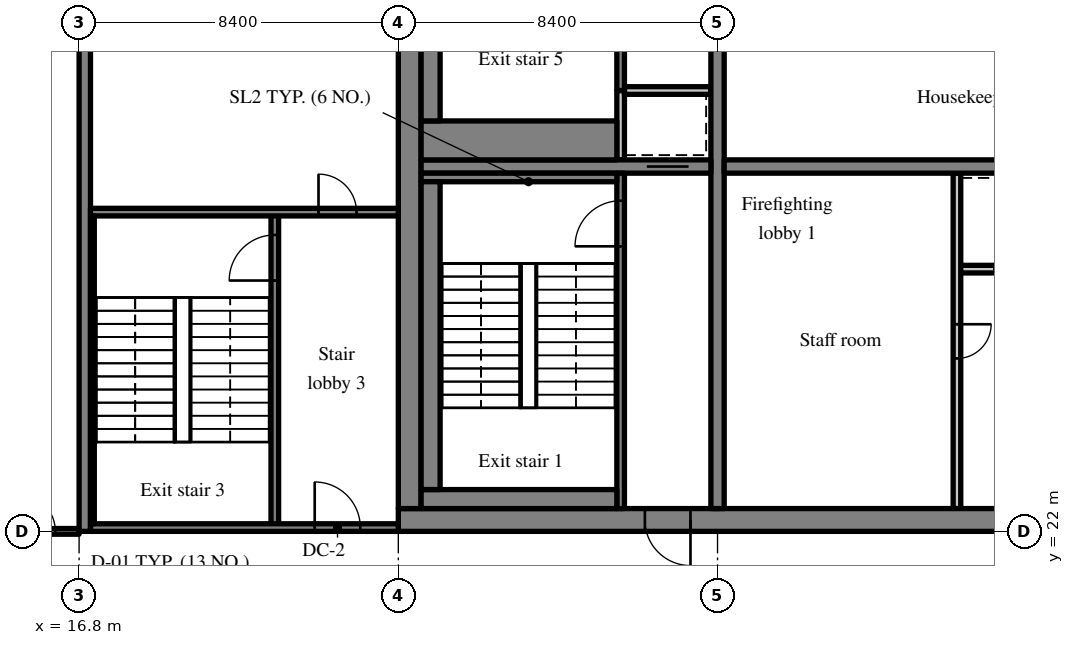
"""IFC4 building model, lengths in metres.
Left out: names, types, materials, properties, quantities, classifications, styles, units other than length and angle.
Written with IfcOpenShell. Run it as: python <this file> out.ifc"""

import sys

from ifc_helpers import new_model, si_unit, direction, frame, frame_2d, origin, place, context, subcontext, project, spatial, rectangle, extrude, source, transform, mapped, element, fill, save


model = new_model("IFC4")
c1 = context("Model", 3, precision=1e-05, world=origin(), true_north=direction((0.0, 1.0)))
c2 = subcontext(c1, "Body", "Model", "MODEL_VIEW")
j1 = project(units=[si_unit("LENGTHUNIT", "METRE"), si_unit("PLANEANGLEUNIT", "RADIAN")], contexts=[c1])
p1 = place(None, origin())
s1 = spatial("IfcSite", under=j1, at=p1, CompositionType="ELEMENT")
p2 = place(p1, origin())
s2 = spatial("IfcBuilding", under=s1, at=p2, CompositionType="ELEMENT")
p3 = place(p2, frame((0.0, 0.0, 249.1)))
s3 = spatial("IfcBuildingStorey", under=s2, at=p3, CompositionType="ELEMENT", Elevation=249.1)
m1 = source(origin(), c2, "Body", "SweptSolid", [
    extrude(rectangle(XDim=50.4, YDim=0.6, at=frame_2d((25.2, 0.0))), origin(), (0.0, 0.0, 1.0), 3.62),
])
p4 = place(p3, frame((25.2, 22.3, 0.0), z_axis=(0.0, 0.0, 1.0), x_axis=(1.0, 0.0, 0.0)))
e1 = element("IfcWall", 1, at=p4, inside=s3, PredefinedType="SHEAR", context=c2, shape_type="MappedRepresentation", body=[
    mapped(m1, transform((0.0, 0.0, 0.0), scale=1.0)),
])
m2 = source(origin(), c2, "Body", "SweptSolid", [
    extrude(rectangle(XDim=1.8, YDim=2.1, at=frame_2d((0.9, 1.05))), frame((0.0, 0.31, 0.0), z_axis=(0.0, -1.0, 0.0), x_axis=(1.0, 0.0, 0.0)), (0.0, 0.0, 1.0), 0.62),
])
p5 = place(p4, frame((15.9, 0.0, 0.0)))
e2 = element("IfcOpeningElement", 2, at=p5, cuts=e1, PredefinedType="OPENING", context=c2, shape_type="MappedRepresentation", body=[
    mapped(m2, transform((0.0, 0.0, 0.0), scale=1.0)),
])
m3 = source(origin(), c2, "Body", "SweptSolid", [
    extrude(rectangle(XDim=0.9, YDim=2.1, at=frame_2d((0.45, 1.05))), frame((0.0, 0.31, 0.0), z_axis=(0.0, -1.0, 0.0), x_axis=(1.0, 0.0, 0.0)), (0.0, 0.0, 1.0), 0.62),
])
p6 = place(p4, frame((21.513, 0.0, 0.0)))
e3 = element("IfcOpeningElement", 3, at=p6, cuts=e1, PredefinedType="OPENING", context=c2, shape_type="MappedRepresentation", body=[
    mapped(m3, transform((0.0, 0.0, 0.0), scale=1.0)),
])
p7 = place(p4, frame((32.7, 0.0, 0.0)))
e4 = element("IfcOpeningElement", 4, at=p7, cuts=e1, PredefinedType="OPENING", context=c2, shape_type="MappedRepresentation", body=[
    mapped(m2, transform((0.0, 0.0, 0.0), scale=1.0)),
])
m4 = source(origin(), c2, "Body", "SweptSolid", [
    extrude(rectangle(XDim=1.2, YDim=2.1, at=frame_2d((0.6, 1.05))), frame((0.0, 0.31, 0.0), z_axis=(0.0, -1.0, 0.0), x_axis=(1.0, 0.0, 0.0)), (0.0, 0.0, 1.0), 0.62),
])
p8 = place(p4, frame((6.488, 0.0, 0.0)))
e5 = element("IfcOpeningElement", 5, at=p8, cuts=e1, PredefinedType="OPENING", context=c2, shape_type="MappedRepresentation", body=[
    mapped(m4, transform((0.0, 0.0, 0.0), scale=1.0)),
])
p9 = place(p4, frame((47.925, 0.0, 0.0)))
e6 = element("IfcOpeningElement", 6, at=p9, cuts=e1, PredefinedType="OPENING", context=c2, shape_type="MappedRepresentation", body=[
    mapped(m4, transform((0.0, 0.0, 0.0), scale=1.0)),
])
m5 = source(origin(), c2, "Body", "SweptSolid", [
    extrude(rectangle(XDim=18.8, YDim=0.6, at=frame_2d((9.4, 0.0))), origin(), (0.0, 0.0, 1.0), 3.62),
])
p10 = place(p3, frame((25.5, 22.6, 0.0), z_axis=(0.0, 0.0, 1.0), x_axis=(0.0, 1.0, 0.0)))
e7 = element("IfcWall", 7, at=p10, inside=s3, PredefinedType="SHEAR", context=c2, shape_type="MappedRepresentation", body=[
    mapped(m5, transform((0.0, 0.0, 0.0), scale=1.0)),
])
m6 = source(origin(), c2, "Body", "SweptSolid", [
    extrude(rectangle(XDim=18.8, YDim=0.35, at=frame_2d((9.4, 0.0))), origin(), (0.0, 0.0, 1.0), 3.62),
])
p11 = place(p3, frame((33.6, 22.6, 0.0), z_axis=(0.0, 0.0, 1.0), x_axis=(0.0, 1.0, 0.0)))
e8 = element("IfcWall", 8, at=p11, inside=s3, PredefinedType="SHEAR", context=c2, shape_type="MappedRepresentation", body=[
    mapped(m6, transform((0.0, 0.0, 0.0), scale=1.0)),
])
m7 = source(origin(), c2, "Body", "SweptSolid", [
    extrude(rectangle(XDim=1.1, YDim=2.1, at=frame_2d((0.55, 1.05))), frame((0.0, 0.185, 0.0), z_axis=(0.0, -1.0, 0.0), x_axis=(1.0, 0.0, 0.0)), (0.0, 0.0, 1.0), 0.37),
])
p12 = place(p11, frame((12.85, 0.0, 0.0)))
e9 = element("IfcOpeningElement", 9, at=p12, cuts=e8, PredefinedType="OPENING", context=c2, shape_type="MappedRepresentation", body=[
    mapped(m7, transform((0.0, 0.0, 0.0), scale=1.0)),
])
m8 = source(origin(), c2, "Body", "SweptSolid", [
    extrude(rectangle(XDim=7.625, YDim=0.35, at=frame_2d((3.812, 0.0))), origin(), (0.0, 0.0, 1.0), 3.62),
])
p13 = place(p3, frame((25.8, 31.6, 0.0), z_axis=(0.0, 0.0, 1.0), x_axis=(1.0, 0.0, 0.0)))
e10 = element("IfcWall", 10, at=p13, inside=s3, PredefinedType="SHEAR", context=c2, shape_type="MappedRepresentation", body=[
    mapped(m8, transform((0.0, 0.0, 0.0), scale=1.0)),
])
p14 = place(p13, frame((5.938, 0.0, 0.0)))
e11 = element("IfcOpeningElement", 11, at=p14, cuts=e10, PredefinedType="OPENING", context=c2, shape_type="MappedRepresentation", body=[
    mapped(m7, transform((0.0, 0.0, 0.0), scale=1.0)),
])
m9 = source(origin(), c2, "Body", "SweptSolid", [
    extrude(rectangle(XDim=16.45, YDim=0.35, at=frame_2d((8.225, 0.0))), origin(), (0.0, 0.0, 1.0), 3.62),
])
p15 = place(p3, frame((33.775, 31.6, 0.0), z_axis=(0.0, 0.0, 1.0), x_axis=(1.0, 0.0, 0.0)))
e12 = element("IfcWall", 12, at=p15, inside=s3, PredefinedType="SHEAR", context=c2, shape_type="MappedRepresentation", body=[
    mapped(m9, transform((0.0, 0.0, 0.0), scale=1.0)),
])
m10 = source(origin(), c2, "Body", "SweptSolid", [
    extrude(rectangle(XDim=1.0, YDim=2.1, at=frame_2d((0.5, 1.05))), frame((0.0, 0.185, 0.0), z_axis=(0.0, -1.0, 0.0), x_axis=(1.0, 0.0, 0.0)), (0.0, 0.0, 1.0), 0.37),
])
p16 = place(p15, frame((14.837, 0.0, 0.0)))
e13 = element("IfcOpeningElement", 13, at=p16, cuts=e12, PredefinedType="OPENING", context=c2, shape_type="MappedRepresentation", body=[
    mapped(m10, transform((0.0, 0.0, 0.0), scale=1.0)),
])
m11 = source(origin(), c2, "Body", "SweptSolid", [
    extrude(rectangle(XDim=18.4, YDim=0.3, at=frame_2d((9.2, 0.0))), origin(), (0.0, 0.0, 1.0), 3.62),
])
p17 = place(p3, frame((16.95, 22.0, 0.0), z_axis=(0.0, 0.0, 1.0), x_axis=(0.0, 1.0, 0.0)))
e14 = element("IfcWall", 14, at=p17, inside=s3, PredefinedType="SHEAR", context=c2, shape_type="MappedRepresentation", body=[
    mapped(m11, transform((0.0, 0.0, 0.0), scale=1.0)),
])
m12 = source(origin(), c2, "Body", "SweptSolid", [
    extrude(rectangle(XDim=6.0, YDim=0.2, at=frame_2d((3.0, 0.0))), origin(), (0.0, 0.0, 1.0), 3.62),
])
p18 = place(p3, frame((39.9, 28.9, 0.0), z_axis=(0.0, 0.0, 1.0), x_axis=(1.0, 0.0, 0.0)))
e15 = element("IfcWall", 15, at=p18, inside=s3, PredefinedType="SOLIDWALL", context=c2, shape_type="MappedRepresentation", body=[
    mapped(m12, transform((0.0, 0.0, 0.0), scale=1.0)),
])
m13 = source(origin(), c2, "Body", "SweptSolid", [
    extrude(rectangle(XDim=1.1, YDim=2.1, at=frame_2d((0.55, 1.05))), frame((0.0, 0.11, 0.0), z_axis=(0.0, -1.0, 0.0), x_axis=(1.0, 0.0, 0.0)), (0.0, 0.0, 1.0), 0.22),
])
p19 = place(p18, frame((0.95, 0.0, 0.0)))
e16 = element("IfcOpeningElement", 16, at=p19, cuts=e15, PredefinedType="OPENING", context=c2, shape_type="MappedRepresentation", body=[
    mapped(m13, transform((0.0, 0.0, 0.0), scale=1.0)),
])
p20 = place(p18, frame((3.95, 0.0, 0.0)))
e17 = element("IfcOpeningElement", 17, at=p20, cuts=e15, PredefinedType="OPENING", context=c2, shape_type="MappedRepresentation", body=[
    mapped(m13, transform((0.0, 0.0, 0.0), scale=1.0)),
])
m14 = source(origin(), c2, "Body", "SweptSolid", [
    extrude(rectangle(XDim=8.825, YDim=0.2, at=frame_2d((4.413, 0.0))), origin(), (0.0, 0.0, 1.0), 3.62),
])
p21 = place(p3, frame((39.9, 22.6, 0.0), z_axis=(0.0, 0.0, 1.0), x_axis=(0.0, 1.0, 0.0)))
e18 = element("IfcWall", 18, at=p21, inside=s3, PredefinedType="PARTITIONING", context=c2, shape_type="MappedRepresentation", body=[
    mapped(m14, transform((0.0, 0.0, 0.0), scale=1.0)),
])
m15 = source(origin(), c2, "Body", "SweptSolid", [
    extrude(rectangle(XDim=0.9, YDim=2.1, at=frame_2d((0.45, 1.05))), frame((0.0, 0.11, 0.0), z_axis=(0.0, -1.0, 0.0), x_axis=(1.0, 0.0, 0.0)), (0.0, 0.0, 1.0), 0.22),
])
p22 = place(p21, frame((3.95, 0.0, 0.0)))
e19 = element("IfcOpeningElement", 19, at=p22, cuts=e18, PredefinedType="OPENING", context=c2, shape_type="MappedRepresentation", body=[
    mapped(m15, transform((0.0, 0.0, 0.0), scale=1.0)),
])
m16 = source(origin(), c2, "Body", "SweptSolid", [
    extrude(rectangle(XDim=8.825, YDim=0.2, at=frame_2d((4.413, 0.0))), origin(), (0.0, 0.0, 1.0), 3.62),
])
p23 = place(p3, frame((31.05, 22.6, 0.0), z_axis=(0.0, 0.0, 1.0), x_axis=(0.0, 1.0, 0.0)))
e20 = element("IfcWall", 20, at=p23, inside=s3, PredefinedType="SOLIDWALL", context=c2, shape_type="MappedRepresentation", body=[
    mapped(m16, transform((0.0, 0.0, 0.0), scale=1.0)),
])
m17 = source(origin(), c2, "Body", "SweptSolid", [
    extrude(rectangle(XDim=1.2, YDim=2.1, at=frame_2d((0.6, 1.05))), frame((0.0, 0.11, 0.0), z_axis=(0.0, -1.0, 0.0), x_axis=(1.0, 0.0, 0.0)), (0.0, 0.0, 1.0), 0.22),
])
p24 = place(p23, frame((6.9, 0.0, 0.0)))
e21 = element("IfcOpeningElement", 21, at=p24, cuts=e20, PredefinedType="OPENING", context=c2, shape_type="MappedRepresentation", body=[
    mapped(m17, transform((0.0, 0.0, 0.0), scale=1.0)),
])
m18 = source(origin(), c2, "Body", "SweptSolid", [
    extrude(rectangle(XDim=1.825, YDim=0.2, at=frame_2d((0.913, 0.0))), origin(), (0.0, 0.0, 1.0), 3.62),
])
p25 = place(p3, frame((31.05, 31.775, 0.0), z_axis=(0.0, 0.0, 1.0), x_axis=(0.0, 1.0, 0.0)))
e22 = element("IfcWall", 22, at=p25, inside=s3, PredefinedType="SOLIDWALL", context=c2, shape_type="MappedRepresentation", body=[
    mapped(m18, transform((0.0, 0.0, 0.0), scale=1.0)),
])
m19 = source(origin(), c2, "Body", "SweptSolid", [
    extrude(rectangle(XDim=2.275, YDim=0.2, at=frame_2d((1.138, 0.0))), origin(), (0.0, 0.0, 1.0), 3.62),
])
p26 = place(p3, frame((31.15, 33.6, 0.0), z_axis=(0.0, 0.0, 1.0), x_axis=(1.0, 0.0, 0.0)))
e23 = element("IfcWall", 23, at=p26, inside=s3, PredefinedType="SOLIDWALL", context=c2, shape_type="MappedRepresentation", body=[
    mapped(m19, transform((0.0, 0.0, 0.0), scale=1.0)),
])
m20 = source(origin(), c2, "Body", "SweptSolid", [
    extrude(rectangle(XDim=7.8, YDim=0.2, at=frame_2d((3.9, 0.0))), origin(), (0.0, 0.0, 1.0), 3.62),
])
p27 = place(p3, frame((31.05, 33.6, 0.0), z_axis=(0.0, 0.0, 1.0), x_axis=(0.0, 1.0, 0.0)))
e24 = element("IfcWall", 24, at=p27, inside=s3, PredefinedType="SOLIDWALL", context=c2, shape_type="MappedRepresentation", body=[
    mapped(m20, transform((0.0, 0.0, 0.0), scale=1.0)),
])
m21 = source(origin(), c2, "Body", "SweptSolid", [
    extrude(rectangle(XDim=1.8, YDim=2.1, at=frame_2d((0.9, 1.05))), frame((0.0, 0.11, 0.0), z_axis=(0.0, -1.0, 0.0), x_axis=(1.0, 0.0, 0.0)), (0.0, 0.0, 1.0), 0.22),
])
p28 = place(p27, frame((5.3, 0.0, 0.0)))
e25 = element("IfcOpeningElement", 25, at=p28, cuts=e24, PredefinedType="OPENING", context=c2, shape_type="MappedRepresentation", body=[
    mapped(m21, transform((0.0, 0.0, 0.0), scale=1.0)),
])
m22 = source(origin(), c2, "Body", "SweptSolid", [
    extrude(rectangle(XDim=8.3, YDim=0.2, at=frame_2d((4.15, 0.0))), origin(), (0.0, 0.0, 1.0), 3.62),
])
p29 = place(p3, frame((21.95, 22.1, 0.0), z_axis=(0.0, 0.0, 1.0), x_axis=(0.0, 1.0, 0.0)))
e26 = element("IfcWall", 26, at=p29, inside=s3, PredefinedType="SOLIDWALL", context=c2, shape_type="MappedRepresentation", body=[
    mapped(m22, transform((0.0, 0.0, 0.0), scale=1.0)),
])
p30 = place(p29, frame((6.5, 0.0, 0.0)))
e27 = element("IfcOpeningElement", 27, at=p30, cuts=e26, PredefinedType="OPENING", context=c2, shape_type="MappedRepresentation", body=[
    mapped(m17, transform((0.0, 0.0, 0.0), scale=1.0)),
])
m23 = source(origin(), c2, "Body", "SweptSolid", [
    extrude(rectangle(XDim=8.1, YDim=0.2, at=frame_2d((4.05, 0.0))), origin(), (0.0, 0.0, 1.0), 3.62),
])
p31 = place(p3, frame((17.1, 22.1, 0.0), z_axis=(0.0, 0.0, 1.0), x_axis=(1.0, 0.0, 0.0)))
e28 = element("IfcWall", 28, at=p31, inside=s3, PredefinedType="SOLIDWALL", context=c2, shape_type="MappedRepresentation", body=[
    mapped(m23, transform((0.0, 0.0, 0.0), scale=1.0)),
])
p32 = place(p31, frame((5.9, 0.0, 0.0)))
e29 = element("IfcOpeningElement", 29, at=p32, cuts=e28, PredefinedType="OPENING", context=c2, shape_type="MappedRepresentation", body=[
    mapped(m17, transform((0.0, 0.0, 0.0), scale=1.0)),
])
p33 = place(p3, frame((17.1, 30.4, 0.0), z_axis=(0.0, 0.0, 1.0), x_axis=(1.0, 0.0, 0.0)))
e30 = element("IfcWall", 30, at=p33, inside=s3, PredefinedType="SOLIDWALL", context=c2, shape_type="MappedRepresentation", body=[
    mapped(m23, transform((0.0, 0.0, 0.0), scale=1.0)),
])
m24 = source(origin(), c2, "Body", "SweptSolid", [
    extrude(rectangle(XDim=1.0, YDim=2.1, at=frame_2d((0.5, 1.05))), frame((0.0, 0.11, 0.0), z_axis=(0.0, -1.0, 0.0), x_axis=(1.0, 0.0, 0.0)), (0.0, 0.0, 1.0), 0.22),
])
p34 = place(p33, frame((6.0, 0.0, 0.0)))
e31 = element("IfcOpeningElement", 31, at=p34, cuts=e30, PredefinedType="OPENING", context=c2, shape_type="MappedRepresentation", body=[
    mapped(m24, transform((0.0, 0.0, 0.0), scale=1.0)),
])
m25 = source(origin(), c2, "Body", "SweptSolid", [
    extrude(rectangle(XDim=5.15, YDim=0.5, at=frame_2d((2.575, 0.0))), origin(), (0.0, 0.0, 1.0), 3.62),
])
p35 = place(p3, frame((25.8, 22.85, 0.0), z_axis=(0.0, 0.0, 1.0), x_axis=(1.0, 0.0, 0.0)))
e32 = element("IfcWall", 32, at=p35, inside=s3, PredefinedType="SOLIDWALL", context=c2, shape_type="MappedRepresentation", body=[
    mapped(m25, transform((0.0, 0.0, 0.0), scale=1.0)),
])
m26 = source(origin(), c2, "Body", "SweptSolid", [
    extrude(rectangle(XDim=5.15, YDim=0.225, at=frame_2d((2.575, 0.0))), origin(), (0.0, 0.0, 1.0), 3.62),
])
p36 = place(p3, frame((25.8, 31.312, 0.0), z_axis=(0.0, 0.0, 1.0), x_axis=(1.0, 0.0, 0.0)))
e33 = element("IfcWall", 33, at=p36, inside=s3, PredefinedType="SOLIDWALL", context=c2, shape_type="MappedRepresentation", body=[
    mapped(m26, transform((0.0, 0.0, 0.0), scale=1.0)),
])
m27 = source(origin(), c2, "Body", "SweptSolid", [
    extrude(rectangle(XDim=8.1, YDim=0.5, at=frame_2d((4.05, 0.0))), origin(), (0.0, 0.0, 1.0), 3.62),
])
p37 = place(p3, frame((26.05, 23.1, 0.0), z_axis=(0.0, 0.0, 1.0), x_axis=(0.0, 1.0, 0.0)))
e34 = element("IfcWall", 34, at=p37, inside=s3, PredefinedType="SOLIDWALL", context=c2, shape_type="MappedRepresentation", body=[
    mapped(m27, transform((0.0, 0.0, 0.0), scale=1.0)),
])
m28 = source(origin(), c2, "Body", "SweptSolid", [
    extrude(rectangle(XDim=8.1, YDim=0.1, at=frame_2d((4.05, 0.0))), origin(), (0.0, 0.0, 1.0), 3.62),
])
p38 = place(p3, frame((17.15, 22.2, 0.0), z_axis=(0.0, 0.0, 1.0), x_axis=(0.0, 1.0, 0.0)))
e35 = element("IfcWall", 35, at=p38, inside=s3, PredefinedType="SOLIDWALL", context=c2, shape_type="MappedRepresentation", body=[
    mapped(m28, transform((0.0, 0.0, 0.0), scale=1.0)),
])
m29 = source(origin(), c2, "Body", "SweptSolid", [
    extrude(rectangle(XDim=5.15, YDim=1.025, at=frame_2d((2.575, 0.0))), origin(), (0.0, 0.0, 1.0), 3.62),
])
p39 = place(p3, frame((25.8, 32.287, 0.0), z_axis=(0.0, 0.0, 1.0), x_axis=(1.0, 0.0, 0.0)))
e36 = element("IfcWall", 36, at=p39, inside=s3, PredefinedType="SOLIDWALL", context=c2, shape_type="MappedRepresentation", body=[
    mapped(m29, transform((0.0, 0.0, 0.0), scale=1.0)),
])
p40 = place(p3, frame((26.05, 32.8, 0.0), z_axis=(0.0, 0.0, 1.0), x_axis=(0.0, 1.0, 0.0)))
e37 = element("IfcWall", 37, at=p40, inside=s3, PredefinedType="SOLIDWALL", context=c2, shape_type="MappedRepresentation", body=[
    mapped(m27, transform((0.0, 0.0, 0.0), scale=1.0)),
])
m30 = source(origin(), c2, "Body", "SweptSolid", [
    extrude(rectangle(XDim=1.9, YDim=0.15, at=frame_2d((0.95, 0.0))), origin(), (0.0, 0.0, 1.0), 2.92),
])
p41 = place(p3, frame((14.9, 22.0, 0.0), z_axis=(0.0, 0.0, 1.0), x_axis=(1.0, 0.0, 0.0)))
e38 = element("IfcWall", 38, at=p41, inside=s3, PredefinedType="PARTITIONING", context=c2, shape_type="MappedRepresentation", body=[
    mapped(m30, transform((0.0, 0.0, 0.0), scale=1.0)),
])
m31 = source(origin(), c2, "Body", "SweptSolid", [
    extrude(rectangle(XDim=1.0, YDim=2.1, at=frame_2d((0.5, 1.05))), frame((0.0, 0.085, 0.0), z_axis=(0.0, -1.0, 0.0), x_axis=(1.0, 0.0, 0.0)), (0.0, 0.0, 1.0), 0.17),
])
p42 = place(p41, frame((0.275, 0.0, 0.0)))
e39 = element("IfcOpeningElement", 39, at=p42, cuts=e38, PredefinedType="OPENING", context=c2, shape_type="MappedRepresentation", body=[
    mapped(m31, transform((0.0, 0.0, 0.0), scale=1.0)),
])
m32 = source(origin(), c2, "Body", "SweptSolid", [
    extrude(rectangle(XDim=1.1, YDim=2.1, at=frame_2d((0.55, 1.05))), frame((0.0, 0.025, 0.0), z_axis=(0.0, -1.0, 0.0), x_axis=(1.0, 0.0, 0.0)), (0.0, 0.0, 1.0), 0.05),
])
p43 = place(p19, origin())
e40 = element("IfcDoor", 40, at=p43, inside=s3, OperationType="SLIDING_TO_LEFT", PredefinedType="DOOR", context=c2, shape_type="MappedRepresentation", body=[
    mapped(m32, transform((0.0, 0.0, 0.0), scale=1.0)),
])
fill(e16, e40)
m33 = source(origin(), c2, "Body", "SweptSolid", [
    extrude(rectangle(XDim=0.9, YDim=2.1, at=frame_2d((0.45, 1.05))), frame((0.0, 0.025, 0.0), z_axis=(0.0, -1.0, 0.0), x_axis=(1.0, 0.0, 0.0)), (0.0, 0.0, 1.0), 0.05),
])
p44 = place(p22, origin())
e41 = element("IfcDoor", 41, at=p44, inside=s3, OperationType="SINGLE_SWING_RIGHT", PredefinedType="DOOR", context=c2, shape_type="MappedRepresentation", body=[
    mapped(m33, transform((0.0, 0.0, 0.0), scale=1.0)),
])
fill(e19, e41)
m34 = source(origin(), c2, "Body", "SweptSolid", [
    extrude(rectangle(XDim=1.2, YDim=2.1, at=frame_2d((0.6, 1.05))), frame((0.0, 0.025, 0.0), z_axis=(0.0, -1.0, 0.0), x_axis=(1.0, 0.0, 0.0)), (0.0, 0.0, 1.0), 0.05),
])
p45 = place(p24, origin())
e42 = element("IfcDoor", 42, at=p45, inside=s3, OperationType="SINGLE_SWING_LEFT", PredefinedType="DOOR", context=c2, shape_type="MappedRepresentation", body=[
    mapped(m34, transform((0.0, 0.0, 0.0), scale=1.0)),
])
fill(e21, e42)
m35 = source(origin(), c2, "Body", "SweptSolid", [
    extrude(rectangle(XDim=1.2, YDim=2.1, at=frame_2d((0.6, 1.05))), frame((0.0, 0.225, 0.0), z_axis=(0.0, -1.0, 0.0), x_axis=(1.0, 0.0, 0.0)), (0.0, 0.0, 1.0), 0.05),
])
p46 = place(p8, origin())
e43 = element("IfcDoor", 43, at=p46, inside=s3, OperationType="SINGLE_SWING_RIGHT", PredefinedType="DOOR", context=c2, shape_type="MappedRepresentation", body=[
    mapped(m35, transform((0.0, 0.0, 0.0), scale=1.0)),
])
fill(e5, e43)
p47 = place(p14, origin())
e44 = element("IfcDoor", 44, at=p47, inside=s3, OperationType="SLIDING_TO_RIGHT", PredefinedType="DOOR", context=c2, shape_type="MappedRepresentation", body=[
    mapped(m32, transform((0.0, 0.0, 0.0), scale=1.0)),
])
fill(e11, e44)
p48 = place(p30, origin())
e45 = element("IfcDoor", 45, at=p48, inside=s3, OperationType="SINGLE_SWING_LEFT", PredefinedType="DOOR", context=c2, shape_type="MappedRepresentation", body=[
    mapped(m34, transform((0.0, 0.0, 0.0), scale=1.0)),
])
fill(e27, e45)
p49 = place(p32, origin())
e46 = element("IfcDoor", 46, at=p49, inside=s3, OperationType="SINGLE_SWING_LEFT", PredefinedType="DOOR", context=c2, shape_type="MappedRepresentation", body=[
    mapped(m34, transform((0.0, 0.0, 0.0), scale=1.0)),
])
fill(e29, e46)
m36 = source(origin(), c2, "Body", "SweptSolid", [
    extrude(rectangle(XDim=1.0, YDim=2.1, at=frame_2d((0.5, 1.05))), frame((0.0, 0.025, 0.0), z_axis=(0.0, -1.0, 0.0), x_axis=(1.0, 0.0, 0.0)), (0.0, 0.0, 1.0), 0.05),
])
p50 = place(p34, origin())
e47 = element("IfcDoor", 47, at=p50, inside=s3, OperationType="SINGLE_SWING_LEFT", PredefinedType="DOOR", context=c2, shape_type="MappedRepresentation", body=[
    mapped(m36, transform((0.0, 0.0, 0.0), scale=1.0)),
])
fill(e31, e47)
p51 = place(p42, origin())
e48 = element("IfcDoor", 48, at=p51, inside=s3, OperationType="SINGLE_SWING_LEFT", PredefinedType="DOOR", context=c2, shape_type="MappedRepresentation", body=[
    mapped(m36, transform((0.0, 0.0, 0.0), scale=1.0)),
])
fill(e39, e48)
save(model, sys.argv[1])
